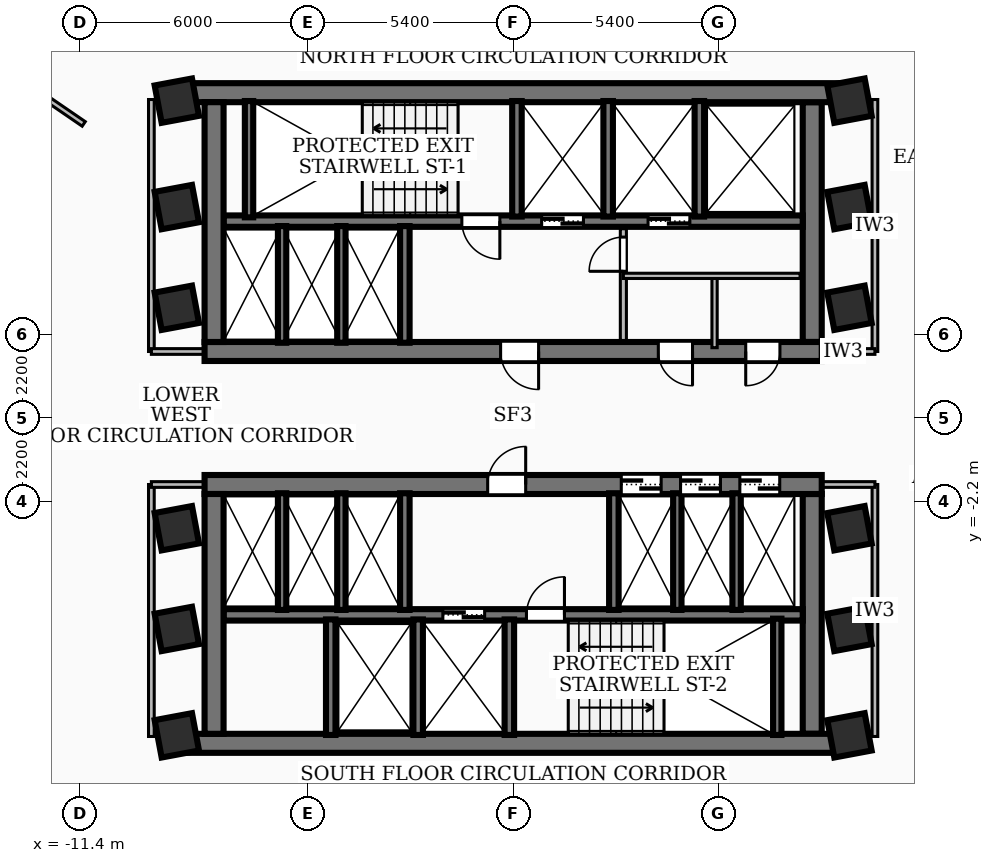
"""IFC4 building model, lengths in metres.
Left out: names, types, materials, properties, quantities, classifications, styles, units other than length and angle.
Written with IfcOpenShell. Run it as: python <this file> out.ifc"""

import sys

from ifc_helpers import new_model, si_unit, direction, frame, frame_2d, origin, origin_2d, place, context, subcontext, project, spatial, rectangle, extrude, element, fill, save


model = new_model("IFC4")
c1 = context("Model", 3, precision=1e-05, world=origin(), true_north=direction((0.0, 1.0)))
c2 = subcontext(c1, "Body", "Model", "MODEL_VIEW")
j1 = project(units=[si_unit("LENGTHUNIT", "METRE"), si_unit("PLANEANGLEUNIT", "RADIAN")], contexts=[c1])
p1 = place(None, origin())
s1 = spatial("IfcSite", under=j1, at=p1, CompositionType="ELEMENT")
p2 = place(p1, origin())
s2 = spatial("IfcBuilding", under=s1, at=p2, CompositionType="ELEMENT")
p3 = place(p2, frame((0.0, 0.0, 100.08)))
s3 = spatial("IfcBuildingStorey", under=s2, at=p3, CompositionType="ELEMENT", Elevation=100.08)
p4 = place(p3, frame((-8.78, 8.56, 0.0), z_axis=(0.0, 0.0, 1.0), x_axis=(1.0, 0.0, 0.0)))
e1 = element("IfcWall", 1, at=p4, inside=s3, PredefinedType="SHEAR", context=c2, shape_type="SweptSolid", body=[
    extrude(rectangle(XDim=17.56, YDim=0.5, at=frame_2d((8.78, 0.0))), origin(), (0.0, 0.0, 1.0), 3.34),
])
p5 = place(p3, frame((8.12, 1.75, 0.0), z_axis=(0.0, 0.0, 1.0), x_axis=(-1.0, 0.0, 0.0)))
e2 = element("IfcWall", 2, at=p5, inside=s3, PredefinedType="SHEAR", context=c2, shape_type="SweptSolid", body=[
    extrude(rectangle(XDim=16.24, YDim=0.5, at=frame_2d((8.12, 0.0))), origin(), (0.0, 0.0, 1.0), 3.34),
])
p6 = place(p5, frame((7.45, 0.0, 0.0)))
e3 = element("IfcOpeningElement", 3, at=p6, cuts=e2, PredefinedType="OPENING", context=c2, shape_type="SweptSolid", body=[
    extrude(rectangle(XDim=1.0, YDim=2.1, at=frame_2d((0.5, 1.05))), frame((0.0, 0.26, 0.0), z_axis=(0.0, -1.0, 0.0), x_axis=(1.0, 0.0, 0.0)), (0.0, 0.0, 1.0), 0.52),
])
p7 = place(p5, frame((3.4, 0.0, 0.0)))
e4 = element("IfcOpeningElement", 4, at=p7, cuts=e2, PredefinedType="OPENING", context=c2, shape_type="SweptSolid", body=[
    extrude(rectangle(XDim=0.9, YDim=2.06, at=frame_2d((0.45, 1.03))), frame((0.0, 0.26, 0.0), z_axis=(0.0, -1.0, 0.0), x_axis=(1.0, 0.0, 0.0)), (0.0, 0.0, 1.0), 0.52),
])
p8 = place(p5, frame((1.1, 0.0, 0.0)))
e5 = element("IfcOpeningElement", 5, at=p8, cuts=e2, PredefinedType="OPENING", context=c2, shape_type="SweptSolid", body=[
    extrude(rectangle(XDim=0.9, YDim=2.06, at=frame_2d((0.45, 1.03))), frame((0.0, 0.26, 0.0), z_axis=(0.0, -1.0, 0.0), x_axis=(1.0, 0.0, 0.0)), (0.0, 0.0, 1.0), 0.52),
])
for number, where, z_axis, x_axis in (
    (6, (-7.87, 2.0, 0.0), (0.0, 0.0, 1.0), (0.0, 1.0, 0.0)),
    (7, (7.87, 8.31, 0.0), (0.0, 0.0, 1.0), (0.0, -1.0, 0.0)),
):
    element("IfcWall", number, at=place(p3, frame(where, z_axis=z_axis, x_axis=x_axis)), inside=s3, PredefinedType="SHEAR", context=c2, shape_type="SweptSolid", body=[
        extrude(rectangle(XDim=6.31, YDim=0.5, at=frame_2d((3.155, 0.0))), origin(), (0.0, 0.0, 1.0), 3.34),
    ])
p9 = place(p3, frame((7.62, 5.18, 0.0), z_axis=(0.0, 0.0, 1.0), x_axis=(-1.0, 0.0, 0.0)))
e8 = element("IfcWall", 8, at=p9, inside=s3, PredefinedType="SOLIDWALL", context=c2, shape_type="SweptSolid", body=[
    extrude(rectangle(XDim=15.24, YDim=0.3, at=frame_2d((7.62, 0.0))), origin(), (0.0, 0.0, 1.0), 3.34),
])
p10 = place(p9, frame((5.77, 0.0, 0.0)))
e9 = element("IfcOpeningElement", 9, at=p10, cuts=e8, PredefinedType="OPENING", context=c2, shape_type="SweptSolid", body=[
    extrude(rectangle(XDim=1.1, YDim=2.15, at=frame_2d((0.55, 1.075))), frame((0.0, 0.16, 0.0), z_axis=(0.0, -1.0, 0.0), x_axis=(1.0, 0.0, 0.0)), (0.0, 0.0, 1.0), 0.32),
])
p11 = place(p9, frame((2.97, 0.0, 0.0)))
e10 = element("IfcOpeningElement", 10, at=p11, cuts=e8, PredefinedType="OPENING", context=c2, shape_type="SweptSolid", body=[
    extrude(rectangle(XDim=1.1, YDim=2.15, at=frame_2d((0.55, 1.075))), frame((0.0, 0.16, 0.0), z_axis=(0.0, -1.0, 0.0), x_axis=(1.0, 0.0, 0.0)), (0.0, 0.0, 1.0), 0.32),
])
p12 = place(p9, frame((7.97, 0.0, 0.0)))
e11 = element("IfcOpeningElement", 11, at=p12, cuts=e8, PredefinedType="OPENING", context=c2, shape_type="SweptSolid", body=[
    extrude(rectangle(XDim=1.0, YDim=2.1, at=frame_2d((0.5, 1.05))), frame((0.0, 0.16, 0.0), z_axis=(0.0, -1.0, 0.0), x_axis=(1.0, 0.0, 0.0)), (0.0, 0.0, 1.0), 0.32),
])
p13 = place(p3, frame((8.78, -8.56, 0.0), z_axis=(0.0, 0.0, 1.0), x_axis=(-1.0, 0.0, 0.0)))
e12 = element("IfcWall", 12, at=p13, inside=s3, PredefinedType="SHEAR", context=c2, shape_type="SweptSolid", body=[
    extrude(rectangle(XDim=17.56, YDim=0.5, at=frame_2d((8.78, 0.0))), origin(), (0.0, 0.0, 1.0), 3.34),
])
p14 = place(p3, frame((-8.12, -1.75, 0.0), z_axis=(0.0, 0.0, 1.0), x_axis=(1.0, 0.0, 0.0)))
e13 = element("IfcWall", 13, at=p14, inside=s3, PredefinedType="SHEAR", context=c2, shape_type="SweptSolid", body=[
    extrude(rectangle(XDim=16.24, YDim=0.5, at=frame_2d((8.12, 0.0))), origin(), (0.0, 0.0, 1.0), 3.34),
])
p15 = place(p14, frame((7.45, 0.0, 0.0)))
e14 = element("IfcOpeningElement", 14, at=p15, cuts=e13, PredefinedType="OPENING", context=c2, shape_type="SweptSolid", body=[
    extrude(rectangle(XDim=1.0, YDim=2.1, at=frame_2d((0.5, 1.05))), frame((0.0, 0.26, 0.0), z_axis=(0.0, -1.0, 0.0), x_axis=(1.0, 0.0, 0.0)), (0.0, 0.0, 1.0), 0.52),
])
p16 = place(p14, frame((10.965, 0.0, 0.0)))
e15 = element("IfcOpeningElement", 15, at=p16, cuts=e13, PredefinedType="OPENING", context=c2, shape_type="SweptSolid", body=[
    extrude(rectangle(XDim=1.05, YDim=2.15, at=frame_2d((0.525, 1.075))), frame((0.0, 0.26, 0.0), z_axis=(0.0, -1.0, 0.0), x_axis=(1.0, 0.0, 0.0)), (0.0, 0.0, 1.0), 0.52),
])
p17 = place(p14, frame((12.525, 0.0, 0.0)))
e16 = element("IfcOpeningElement", 16, at=p17, cuts=e13, PredefinedType="OPENING", context=c2, shape_type="SweptSolid", body=[
    extrude(rectangle(XDim=1.05, YDim=2.15, at=frame_2d((0.525, 1.075))), frame((0.0, 0.26, 0.0), z_axis=(0.0, -1.0, 0.0), x_axis=(1.0, 0.0, 0.0)), (0.0, 0.0, 1.0), 0.52),
])
p18 = place(p14, frame((14.085, 0.0, 0.0)))
e17 = element("IfcOpeningElement", 17, at=p18, cuts=e13, PredefinedType="OPENING", context=c2, shape_type="SweptSolid", body=[
    extrude(rectangle(XDim=1.05, YDim=2.15, at=frame_2d((0.525, 1.075))), frame((0.0, 0.26, 0.0), z_axis=(0.0, -1.0, 0.0), x_axis=(1.0, 0.0, 0.0)), (0.0, 0.0, 1.0), 0.52),
])
for number, where, z_axis, x_axis in (
    (18, (-7.87, -8.31, 0.0), (0.0, 0.0, 1.0), (0.0, 1.0, 0.0)),
    (19, (7.87, -2.0, 0.0), (0.0, 0.0, 1.0), (0.0, -1.0, 0.0)),
):
    element("IfcWall", number, at=place(p3, frame(where, z_axis=z_axis, x_axis=x_axis)), inside=s3, PredefinedType="SHEAR", context=c2, shape_type="SweptSolid", body=[
        extrude(rectangle(XDim=6.31, YDim=0.5, at=frame_2d((3.155, 0.0))), origin(), (0.0, 0.0, 1.0), 3.34),
    ])
p19 = place(p3, frame((-7.62, -5.18, 0.0), z_axis=(0.0, 0.0, 1.0), x_axis=(1.0, 0.0, 0.0)))
e20 = element("IfcWall", 20, at=p19, inside=s3, PredefinedType="SOLIDWALL", context=c2, shape_type="SweptSolid", body=[
    extrude(rectangle(XDim=15.24, YDim=0.3, at=frame_2d((7.62, 0.0))), origin(), (0.0, 0.0, 1.0), 3.34),
])
p20 = place(p19, frame((5.77, 0.0, 0.0)))
e21 = element("IfcOpeningElement", 21, at=p20, cuts=e20, PredefinedType="OPENING", context=c2, shape_type="SweptSolid", body=[
    extrude(rectangle(XDim=1.1, YDim=2.15, at=frame_2d((0.55, 1.075))), frame((0.0, 0.16, 0.0), z_axis=(0.0, -1.0, 0.0), x_axis=(1.0, 0.0, 0.0)), (0.0, 0.0, 1.0), 0.32),
])
p21 = place(p19, frame((7.97, 0.0, 0.0)))
e22 = element("IfcOpeningElement", 22, at=p21, cuts=e20, PredefinedType="OPENING", context=c2, shape_type="SweptSolid", body=[
    extrude(rectangle(XDim=1.0, YDim=2.1, at=frame_2d((0.5, 1.05))), frame((0.0, 0.16, 0.0), z_axis=(0.0, -1.0, 0.0), x_axis=(1.0, 0.0, 0.0)), (0.0, 0.0, 1.0), 0.32),
])
for number, where, z_axis, x_axis in (
    (23, (-6.95, 5.28, 0.0), (0.0, 0.0, 1.0), (0.0, 1.0, 0.0)),
    (24, (6.95, -8.34, 0.0), (0.0, 0.0, 1.0), (0.0, 1.0, 0.0)),
):
    element("IfcWall", number, at=place(p3, frame(where, z_axis=z_axis, x_axis=x_axis)), inside=s3, PredefinedType="SOLIDWALL", context=c2, shape_type="SweptSolid", body=[
        extrude(rectangle(XDim=3.06, YDim=0.22, at=frame_2d((1.53, 0.0))), origin(), (0.0, 0.0, 1.0), 3.34),
    ])
for number, where, z_axis, x_axis in (
    (25, (0.1, 5.3, 0.0), (0.0, 0.0, 1.0), (0.0, 1.0, 0.0)),
    (26, (2.5, 5.3, 0.0), (0.0, 0.0, 1.0), (0.0, 1.0, 0.0)),
    (27, (4.9, 5.3, 0.0), (0.0, 0.0, 1.0), (0.0, 1.0, 0.0)),
):
    element("IfcWall", number, at=place(p3, frame(where, z_axis=z_axis, x_axis=x_axis)), inside=s3, PredefinedType="SOLIDWALL", context=c2, shape_type="SweptSolid", body=[
        extrude(rectangle(XDim=3.04, YDim=0.25, at=frame_2d((1.52, 0.0))), origin(), (0.0, 0.0, 1.0), 3.34),
    ])
p22 = place(p3, frame((-2.85, 1.98, 0.0), z_axis=(0.0, 0.0, 1.0), x_axis=(0.0, 1.0, 0.0)))
e28 = element("IfcWall", 28, at=p22, inside=s3, PredefinedType="SOLIDWALL", context=c2, shape_type="SweptSolid", body=[
    extrude(rectangle(XDim=3.07, YDim=0.25, at=frame_2d((1.535, 0.0))), origin(), (0.0, 0.0, 1.0), 3.34),
])
for number, where, z_axis, x_axis in (
    (29, (-0.1, -8.34, 0.0), (0.0, 0.0, 1.0), (0.0, 1.0, 0.0)),
    (30, (-2.5, -8.34, 0.0), (0.0, 0.0, 1.0), (0.0, 1.0, 0.0)),
    (31, (-4.8, -8.34, 0.0), (0.0, 0.0, 1.0), (0.0, 1.0, 0.0)),
):
    element("IfcWall", number, at=place(p3, frame(where, z_axis=z_axis, x_axis=x_axis)), inside=s3, PredefinedType="SOLIDWALL", context=c2, shape_type="SweptSolid", body=[
        extrude(rectangle(XDim=3.04, YDim=0.25, at=frame_2d((1.52, 0.0))), origin(), (0.0, 0.0, 1.0), 3.34),
    ])
for number, where, z_axis, x_axis in (
    (32, (-2.85, -5.05, 0.0), (0.0, 0.0, 1.0), (0.0, 1.0, 0.0)),
    (33, (2.65, -5.05, 0.0), (0.0, 0.0, 1.0), (0.0, 1.0, 0.0)),
):
    element("IfcWall", number, at=place(p3, frame(where, z_axis=z_axis, x_axis=x_axis)), inside=s3, PredefinedType="SOLIDWALL", context=c2, shape_type="SweptSolid", body=[
        extrude(rectangle(XDim=3.07, YDim=0.25, at=frame_2d((1.535, 0.0))), origin(), (0.0, 0.0, 1.0), 3.34),
    ])
for number, where, z_axis, x_axis in (
    (34, (-6.08, 1.98, 0.0), (0.0, 0.0, 1.0), (0.0, 1.0, 0.0)),
    (35, (-4.52, 1.98, 0.0), (0.0, 0.0, 1.0), (0.0, 1.0, 0.0)),
    (36, (4.32, -5.05, 0.0), (0.0, 0.0, 1.0), (0.0, 1.0, 0.0)),
    (37, (5.88, -5.05, 0.0), (0.0, 0.0, 1.0), (0.0, 1.0, 0.0)),
    (38, (-6.08, -5.05, 0.0), (0.0, 0.0, 1.0), (0.0, 1.0, 0.0)),
    (39, (-4.52, -5.05, 0.0), (0.0, 0.0, 1.0), (0.0, 1.0, 0.0)),
):
    element("IfcWall", number, at=place(p3, frame(where, z_axis=z_axis, x_axis=x_axis)), inside=s3, PredefinedType="SOLIDWALL", context=c2, shape_type="SweptSolid", body=[
        extrude(rectangle(XDim=3.07, YDim=0.22, at=frame_2d((1.535, 0.0))), origin(), (0.0, 0.0, 1.0), 3.34),
    ])
for number, where, z_axis, x_axis in (
    (40, (-8.85, -5.55, 0.0), (0.0, 0.0, 1.0), (0.983, 0.184, 0.0)),
    (41, (-8.85, -2.9, 0.0), (0.0, 0.0, 1.0), (0.983, 0.184, 0.0)),
    (42, (-8.85, 2.9, 0.0), (0.0, 0.0, 1.0), (0.983, 0.184, 0.0)),
    (43, (-8.85, 5.55, 0.0), (0.0, 0.0, 1.0), (0.983, 0.184, 0.0)),
    (44, (8.85, -5.55, 0.0), (0.0, 0.0, 1.0), (0.983, 0.184, 0.0)),
    (45, (8.85, -2.9, 0.0), (0.0, 0.0, 1.0), (0.983, 0.184, 0.0)),
    (46, (8.85, 2.9, 0.0), (0.0, 0.0, 1.0), (0.983, 0.184, 0.0)),
    (47, (8.85, 5.55, 0.0), (0.0, 0.0, 1.0), (0.983, 0.184, 0.0)),
    (48, (-8.85, 8.35, 0.0), (0.0, 0.0, 1.0), (0.983, 0.184, 0.0)),
    (49, (8.85, -8.35, 0.0), (0.0, 0.0, 1.0), (0.983, 0.184, 0.0)),
    (50, (8.85, 8.35, 0.0), (0.0, 0.0, 1.0), (0.983, 0.184, 0.0)),
    (51, (-8.85, -8.35, 0.0), (0.0, 0.0, 1.0), (0.983, 0.184, 0.0)),
):
    element("IfcColumn", number, at=place(p3, frame(where, z_axis=z_axis, x_axis=x_axis)), inside=s3, PredefinedType="COLUMN", context=c2, shape_type="SweptSolid", body=[
        extrude(rectangle(XDim=1.0, YDim=1.0, at=origin_2d()), origin(), (0.0, 0.0, 1.0), 3.6),
    ])
p23 = place(p3, frame((-11.799, -15.393, 0.0), z_axis=(0.0, 0.0, 1.0), x_axis=(-0.184184115697, 0.982891759821, 0.0)))
e52 = element("IfcWall", 52, at=p23, inside=s3, PredefinedType="SOLIDWALL", context=c2, shape_type="SweptSolid", body=[
    extrude(rectangle(XDim=6.776, YDim=0.24, at=frame_2d((3.388, 0.0))), origin(), (0.0, 0.0, 1.0), 3.34),
])
p24 = place(p3, frame((2.9, 2.04, 0.0), z_axis=(0.0, 0.0, 1.0), x_axis=(0.0, 1.0, 0.0)))
e53 = element("IfcWall", 53, at=p24, inside=s3, PredefinedType="PARTITIONING", context=c2, shape_type="SweptSolid", body=[
    extrude(rectangle(XDim=2.94, YDim=0.16, at=frame_2d((1.47, 0.0))), origin(), (0.0, 0.0, 1.0), 2.405),
])
p25 = place(p24, frame((1.82, 0.0, 0.0)))
e54 = element("IfcOpeningElement", 54, at=p25, cuts=e53, PredefinedType="OPENING", context=c2, shape_type="SweptSolid", body=[
    extrude(rectangle(XDim=0.9, YDim=2.06, at=frame_2d((0.45, 1.03))), frame((0.0, 0.09, 0.0), z_axis=(0.0, -1.0, 0.0), x_axis=(1.0, 0.0, 0.0)), (0.0, 0.0, 1.0), 0.18),
])
p26 = place(p3, frame((2.9, 3.74, 0.0), z_axis=(0.0, 0.0, 1.0), x_axis=(1.0, 0.0, 0.0)))
e55 = element("IfcWall", 55, at=p26, inside=s3, PredefinedType="PARTITIONING", context=c2, shape_type="SweptSolid", body=[
    extrude(rectangle(XDim=4.65, YDim=0.138, at=frame_2d((2.325, 0.0))), origin(), (0.0, 0.0, 1.0), 3.34),
])
p27 = place(p3, frame((5.3, 1.85, 0.0), z_axis=(0.0, 0.0, 1.0), x_axis=(0.0, 1.0, 0.0)))
e56 = element("IfcWall", 56, at=p27, inside=s3, PredefinedType="PARTITIONING", context=c2, shape_type="SweptSolid", body=[
    extrude(rectangle(XDim=1.89, YDim=0.138, at=frame_2d((0.945, 0.0))), origin(), (0.0, 0.0, 1.0), 2.405),
])
p28 = place(p3, frame((-9.52, 1.75, 0.0), z_axis=(0.0, 0.0, 1.0), x_axis=(0.0, 1.0, 0.0)))
e57 = element("IfcWall", 57, at=p28, inside=s3, PredefinedType="PARTITIONING", context=c2, shape_type="SweptSolid", body=[
    extrude(rectangle(XDim=6.63, YDim=0.15, at=frame_2d((3.315, 0.0))), origin(), (0.0, 0.0, 1.0), 2.486),
])
p29 = place(p3, frame((-7.85, 1.75, 0.0), z_axis=(0.0, 0.0, 1.0), x_axis=(-1.0, 0.0, 0.0)))
e58 = element("IfcWall", 58, at=p29, inside=s3, PredefinedType="PARTITIONING", context=c2, shape_type="SweptSolid", body=[
    extrude(rectangle(XDim=1.67, YDim=0.15, at=frame_2d((0.835, 0.0))), origin(), (0.0, 0.0, 1.0), 2.405),
])
p30 = place(p3, frame((-9.52, -8.38, 0.0), z_axis=(0.0, 0.0, 1.0), x_axis=(0.0, 1.0, 0.0)))
e59 = element("IfcWall", 59, at=p30, inside=s3, PredefinedType="PARTITIONING", context=c2, shape_type="SweptSolid", body=[
    extrude(rectangle(XDim=6.63, YDim=0.15, at=frame_2d((3.315, 0.0))), origin(), (0.0, 0.0, 1.0), 2.486),
])
p31 = place(p3, frame((-7.85, -1.75, 0.0), z_axis=(0.0, 0.0, 1.0), x_axis=(-1.0, 0.0, 0.0)))
e60 = element("IfcWall", 60, at=p31, inside=s3, PredefinedType="PARTITIONING", context=c2, shape_type="SweptSolid", body=[
    extrude(rectangle(XDim=1.67, YDim=0.15, at=frame_2d((0.835, 0.0))), origin(), (0.0, 0.0, 1.0), 2.405),
])
p32 = place(p3, frame((9.52, 1.75, 0.0), z_axis=(0.0, 0.0, 1.0), x_axis=(0.0, 1.0, 0.0)))
e61 = element("IfcWall", 61, at=p32, inside=s3, PredefinedType="PARTITIONING", context=c2, shape_type="SweptSolid", body=[
    extrude(rectangle(XDim=6.63, YDim=0.15, at=frame_2d((3.315, 0.0))), origin(), (0.0, 0.0, 1.0), 2.486),
])
p33 = place(p3, frame((7.85, 1.75, 0.0), z_axis=(0.0, 0.0, 1.0), x_axis=(1.0, 0.0, 0.0)))
e62 = element("IfcWall", 62, at=p33, inside=s3, PredefinedType="PARTITIONING", context=c2, shape_type="SweptSolid", body=[
    extrude(rectangle(XDim=1.67, YDim=0.15, at=frame_2d((0.835, 0.0))), origin(), (0.0, 0.0, 1.0), 2.405),
])
p34 = place(p3, frame((9.52, -8.38, 0.0), z_axis=(0.0, 0.0, 1.0), x_axis=(0.0, 1.0, 0.0)))
e63 = element("IfcWall", 63, at=p34, inside=s3, PredefinedType="PARTITIONING", context=c2, shape_type="SweptSolid", body=[
    extrude(rectangle(XDim=6.63, YDim=0.15, at=frame_2d((3.315, 0.0))), origin(), (0.0, 0.0, 1.0), 2.486),
])
p35 = place(p3, frame((7.85, -1.75, 0.0), z_axis=(0.0, 0.0, 1.0), x_axis=(1.0, 0.0, 0.0)))
e64 = element("IfcWall", 64, at=p35, inside=s3, PredefinedType="PARTITIONING", context=c2, shape_type="SweptSolid", body=[
    extrude(rectangle(XDim=1.67, YDim=0.15, at=frame_2d((0.835, 0.0))), origin(), (0.0, 0.0, 1.0), 2.405),
])
p36 = place(p3, frame((-11.3, 7.738, 0.0), z_axis=(0.0, 0.0, 1.0), x_axis=(-0.825173577049, 0.564879250584, 0.0)))
e65 = element("IfcWall", 65, at=p36, inside=s3, PredefinedType="PARTITIONING", context=c2, shape_type="SweptSolid", body=[
    extrude(rectangle(XDim=5.959, YDim=0.145, at=frame_2d((2.979, 0.0))), origin(), (0.0, 0.0, 1.0), 3.34),
])
p37 = place(p3, frame((-13.794, -3.975, 0.0), z_axis=(0.0, 0.0, 1.0), x_axis=(0.183947683851, -0.982936035358, 0.0)))
e66 = element("IfcWall", 66, at=p37, inside=s3, PredefinedType="PARTITIONING", context=c2, shape_type="SweptSolid", body=[
    extrude(rectangle(XDim=8.65, YDim=0.145, at=frame_2d((4.325, 0.0))), origin(), (0.0, 0.0, 1.0), 2.486),
])
p38 = place(p6, origin())
e67 = element("IfcDoor", 67, at=p38, inside=s3, OperationType="SINGLE_SWING_LEFT", PredefinedType="DOOR", context=c2, shape_type="SweptSolid", body=[
    extrude(rectangle(XDim=1.0, YDim=2.1, at=frame_2d((0.5, 1.05))), frame((0.0, 0.025, 0.0), z_axis=(0.0, -1.0, 0.0), x_axis=(1.0, 0.0, 0.0)), (0.0, 0.0, 1.0), 0.05),
])
fill(e3, e67)
p39 = place(p15, origin())
e68 = element("IfcDoor", 68, at=p39, inside=s3, OperationType="SINGLE_SWING_RIGHT", PredefinedType="DOOR", context=c2, shape_type="SweptSolid", body=[
    extrude(rectangle(XDim=1.0, YDim=2.1, at=frame_2d((0.5, 1.05))), frame((0.0, 0.025, 0.0), z_axis=(0.0, -1.0, 0.0), x_axis=(1.0, 0.0, 0.0)), (0.0, 0.0, 1.0), 0.05),
])
fill(e14, e68)
p40 = place(p10, origin())
e69 = element("IfcDoor", 69, at=p40, inside=s3, OperationType="DOUBLE_DOOR_SLIDING", PredefinedType="DOOR", context=c2, shape_type="SweptSolid", body=[
    extrude(rectangle(XDim=1.1, YDim=2.15, at=frame_2d((0.55, 1.075))), frame((0.0, 0.025, 0.0), z_axis=(0.0, -1.0, 0.0), x_axis=(1.0, 0.0, 0.0)), (0.0, 0.0, 1.0), 0.05),
])
fill(e9, e69)
p41 = place(p11, origin())
e70 = element("IfcDoor", 70, at=p41, inside=s3, OperationType="DOUBLE_DOOR_SLIDING", PredefinedType="DOOR", context=c2, shape_type="SweptSolid", body=[
    extrude(rectangle(XDim=1.1, YDim=2.15, at=frame_2d((0.55, 1.075))), frame((0.0, 0.025, 0.0), z_axis=(0.0, -1.0, 0.0), x_axis=(1.0, 0.0, 0.0)), (0.0, 0.0, 1.0), 0.05),
])
fill(e10, e70)
p42 = place(p12, origin())
e71 = element("IfcDoor", 71, at=p42, inside=s3, OperationType="SINGLE_SWING_LEFT", PredefinedType="DOOR", context=c2, shape_type="SweptSolid", body=[
    extrude(rectangle(XDim=1.0, YDim=2.1, at=frame_2d((0.5, 1.05))), frame((0.0, 0.025, 0.0), z_axis=(0.0, -1.0, 0.0), x_axis=(1.0, 0.0, 0.0)), (0.0, 0.0, 1.0), 0.05),
])
fill(e11, e71)
p43 = place(p20, origin())
e72 = element("IfcDoor", 72, at=p43, inside=s3, OperationType="DOUBLE_DOOR_SLIDING", PredefinedType="DOOR", context=c2, shape_type="SweptSolid", body=[
    extrude(rectangle(XDim=1.1, YDim=2.15, at=frame_2d((0.55, 1.075))), frame((0.0, 0.025, 0.0), z_axis=(0.0, -1.0, 0.0), x_axis=(1.0, 0.0, 0.0)), (0.0, 0.0, 1.0), 0.05),
])
fill(e21, e72)
p44 = place(p21, origin())
e73 = element("IfcDoor", 73, at=p44, inside=s3, OperationType="SINGLE_SWING_RIGHT", PredefinedType="DOOR", context=c2, shape_type="SweptSolid", body=[
    extrude(rectangle(XDim=1.0, YDim=2.1, at=frame_2d((0.5, 1.05))), frame((0.0, 0.025, 0.0), z_axis=(0.0, -1.0, 0.0), x_axis=(1.0, 0.0, 0.0)), (0.0, 0.0, 1.0), 0.05),
])
fill(e22, e73)
p45 = place(p16, origin())
e74 = element("IfcDoor", 74, at=p45, inside=s3, OperationType="DOUBLE_DOOR_SLIDING", PredefinedType="DOOR", context=c2, shape_type="SweptSolid", body=[
    extrude(rectangle(XDim=1.05, YDim=2.15, at=frame_2d((0.525, 1.075))), frame((0.0, 0.025, 0.0), z_axis=(0.0, -1.0, 0.0), x_axis=(1.0, 0.0, 0.0)), (0.0, 0.0, 1.0), 0.05),
])
fill(e15, e74)
p46 = place(p17, origin())
e75 = element("IfcDoor", 75, at=p46, inside=s3, OperationType="DOUBLE_DOOR_SLIDING", PredefinedType="DOOR", context=c2, shape_type="SweptSolid", body=[
    extrude(rectangle(XDim=1.05, YDim=2.15, at=frame_2d((0.525, 1.075))), frame((0.0, 0.025, 0.0), z_axis=(0.0, -1.0, 0.0), x_axis=(1.0, 0.0, 0.0)), (0.0, 0.0, 1.0), 0.05),
])
fill(e16, e75)
p47 = place(p18, origin())
e76 = element("IfcDoor", 76, at=p47, inside=s3, OperationType="DOUBLE_DOOR_SLIDING", PredefinedType="DOOR", context=c2, shape_type="SweptSolid", body=[
    extrude(rectangle(XDim=1.05, YDim=2.15, at=frame_2d((0.525, 1.075))), frame((0.0, 0.025, 0.0), z_axis=(0.0, -1.0, 0.0), x_axis=(1.0, 0.0, 0.0)), (0.0, 0.0, 1.0), 0.05),
])
fill(e17, e76)
p48 = place(p7, origin())
e77 = element("IfcDoor", 77, at=p48, inside=s3, OperationType="SINGLE_SWING_LEFT", PredefinedType="DOOR", context=c2, shape_type="SweptSolid", body=[
    extrude(rectangle(XDim=0.9, YDim=2.06, at=frame_2d((0.45, 1.03))), frame((0.0, 0.025, 0.0), z_axis=(0.0, -1.0, 0.0), x_axis=(1.0, 0.0, 0.0)), (0.0, 0.0, 1.0), 0.05),
])
fill(e4, e77)
p49 = place(p8, origin())
e78 = element("IfcDoor", 78, at=p49, inside=s3, OperationType="SINGLE_SWING_RIGHT", PredefinedType="DOOR", context=c2, shape_type="SweptSolid", body=[
    extrude(rectangle(XDim=0.9, YDim=2.06, at=frame_2d((0.45, 1.03))), frame((0.0, 0.025, 0.0), z_axis=(0.0, -1.0, 0.0), x_axis=(1.0, 0.0, 0.0)), (0.0, 0.0, 1.0), 0.05),
])
fill(e5, e78)
p50 = place(p25, origin())
e79 = element("IfcDoor", 79, at=p50, inside=s3, OperationType="SINGLE_SWING_LEFT", PredefinedType="DOOR", context=c2, shape_type="SweptSolid", body=[
    extrude(rectangle(XDim=0.9, YDim=2.06, at=frame_2d((0.45, 1.03))), frame((0.0, 0.025, 0.0), z_axis=(0.0, -1.0, 0.0), x_axis=(1.0, 0.0, 0.0)), (0.0, 0.0, 1.0), 0.05),
])
fill(e54, e79)
save(model, sys.argv[1])
